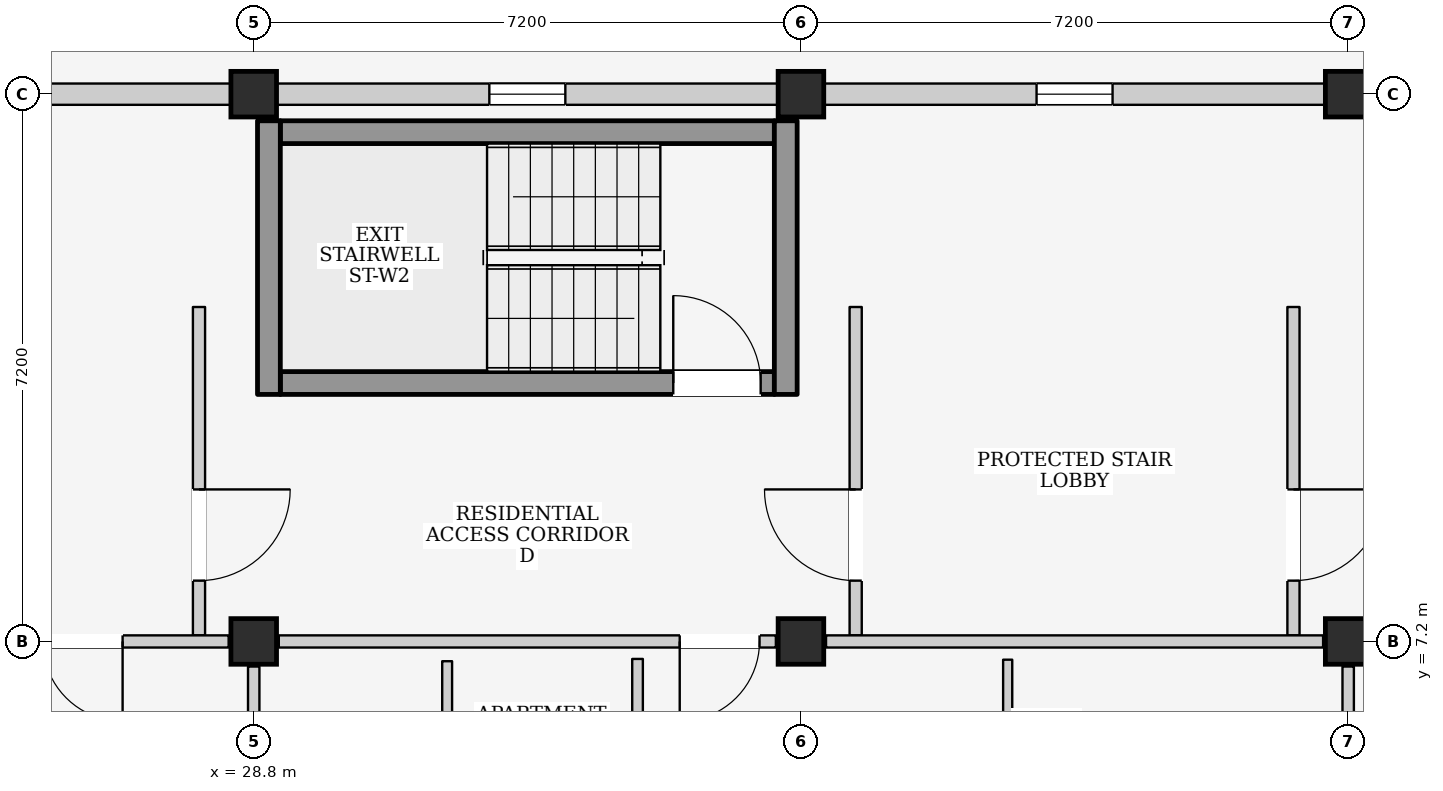
"""IFC4 building model, lengths in metres.
Left out: names, types, materials, properties, quantities, classifications, styles, units other than length and angle.
Written with IfcOpenShell. Run it as: python <this file> out.ifc"""

import sys

from ifc_helpers import new_model, si_unit, direction, frame, frame_2d, origin, origin_2d, place, context, subcontext, project, spatial, rectangle, extrude, element, fill, save


model = new_model("IFC4")
c1 = context("Model", 3, precision=1e-05, world=origin(), true_north=direction((0.0, 1.0)))
c2 = subcontext(c1, "Body", "Model", "MODEL_VIEW")
j1 = project(units=[si_unit("LENGTHUNIT", "METRE"), si_unit("PLANEANGLEUNIT", "RADIAN")], contexts=[c1])
p1 = place(None, origin())
s1 = spatial("IfcSite", under=j1, at=p1, CompositionType="ELEMENT")
p2 = place(p1, origin())
s2 = spatial("IfcBuilding", under=s1, at=p2, CompositionType="ELEMENT")
p3 = place(p2, frame((0.0, 0.0, 9.0)))
s3 = spatial("IfcBuildingStorey", under=s2, at=p3, CompositionType="ELEMENT", Elevation=9.0)
for number, where, z_axis, x_axis in (
    (1, (28.8, 7.2, 0.0), (0.0, 0.0, 1.0), (1.0, 0.0, 0.0)),
    (2, (28.8, 14.4, 0.0), (0.0, 0.0, 1.0), (1.0, 0.0, 0.0)),
    (3, (36.0, 7.2, 0.0), (0.0, 0.0, 1.0), (1.0, 0.0, 0.0)),
    (4, (36.0, 14.4, 0.0), (0.0, 0.0, 1.0), (1.0, 0.0, 0.0)),
    (5, (43.2, 7.2, 0.0), (0.0, 0.0, 1.0), (1.0, 0.0, 0.0)),
    (6, (43.2, 14.4, 0.0), (0.0, 0.0, 1.0), (1.0, 0.0, 0.0)),
):
    element("IfcColumn", number, at=place(p3, frame(where, z_axis=z_axis, x_axis=x_axis)), inside=s3, PredefinedType="COLUMN", context=c2, shape_type="SweptSolid", body=[
        extrude(rectangle(XDim=0.6, YDim=0.6, at=origin_2d()), origin(), (0.0, 0.0, 1.0), 3.2),
    ])
p4 = place(p3, frame((21.9, 14.4, 0.0), z_axis=(0.0, 0.0, 1.0), x_axis=(1.0, 0.0, 0.0)))
e7 = element("IfcWall", 7, at=p4, inside=s3, PredefinedType="ELEMENTEDWALL", context=c2, shape_type="SweptSolid", body=[
    extrude(rectangle(XDim=6.6, YDim=0.28, at=frame_2d((3.3, 0.0))), origin(), (0.0, 0.0, 1.0), 2.345),
])
p5 = place(p4, frame((2.8, 0.0, 1.2)))
e8 = element("IfcOpeningElement", 8, at=p5, cuts=e7, PredefinedType="OPENING", context=c2, shape_type="SweptSolid", body=[
    extrude(rectangle(XDim=1.0, YDim=0.9, at=frame_2d((0.5, 0.45))), frame((0.0, 0.155, 0.0), z_axis=(0.0, -1.0, 0.0), x_axis=(1.0, 0.0, 0.0)), (0.0, 0.0, 1.0), 0.31),
])
p6 = place(p3, frame((29.1, 14.4, 0.0), z_axis=(0.0, 0.0, 1.0), x_axis=(1.0, 0.0, 0.0)))
e9 = element("IfcWall", 9, at=p6, inside=s3, PredefinedType="ELEMENTEDWALL", context=c2, shape_type="SweptSolid", body=[
    extrude(rectangle(XDim=6.6, YDim=0.28, at=frame_2d((3.3, 0.0))), origin(), (0.0, 0.0, 1.0), 2.345),
])
p7 = place(p6, frame((2.8, 0.0, 1.2)))
e10 = element("IfcOpeningElement", 10, at=p7, cuts=e9, PredefinedType="OPENING", context=c2, shape_type="SweptSolid", body=[
    extrude(rectangle(XDim=1.0, YDim=0.9, at=frame_2d((0.5, 0.45))), frame((0.0, 0.155, 0.0), z_axis=(0.0, -1.0, 0.0), x_axis=(1.0, 0.0, 0.0)), (0.0, 0.0, 1.0), 0.31),
])
p8 = place(p3, frame((36.3, 14.4, 0.0), z_axis=(0.0, 0.0, 1.0), x_axis=(1.0, 0.0, 0.0)))
e11 = element("IfcWall", 11, at=p8, inside=s3, PredefinedType="ELEMENTEDWALL", context=c2, shape_type="SweptSolid", body=[
    extrude(rectangle(XDim=6.6, YDim=0.28, at=frame_2d((3.3, 0.0))), origin(), (0.0, 0.0, 1.0), 2.345),
])
p9 = place(p8, frame((2.8, 0.0, 1.2)))
e12 = element("IfcOpeningElement", 12, at=p9, cuts=e11, PredefinedType="OPENING", context=c2, shape_type="SweptSolid", body=[
    extrude(rectangle(XDim=1.0, YDim=0.9, at=frame_2d((0.5, 0.45))), frame((0.0, 0.155, 0.0), z_axis=(0.0, -1.0, 0.0), x_axis=(1.0, 0.0, 0.0)), (0.0, 0.0, 1.0), 0.31),
])
p10 = place(p3, frame((28.08, 7.28, 0.0), z_axis=(0.0, 0.0, 1.0), x_axis=(0.0, 1.0, 0.0)))
e13 = element("IfcWall", 13, at=p10, inside=s3, PredefinedType="PARTITIONING", context=c2, shape_type="SweptSolid", body=[
    extrude(rectangle(XDim=4.32, YDim=0.16, at=frame_2d((2.16, 0.0))), origin(), (0.0, 0.0, 1.0), 2.96),
])
p11 = place(p10, frame((0.72, 0.0, 0.0)))
e14 = element("IfcOpeningElement", 14, at=p11, cuts=e13, PredefinedType="OPENING", context=c2, shape_type="SweptSolid", body=[
    extrude(rectangle(XDim=1.2, YDim=2.2, at=frame_2d((0.6, 1.1))), frame((0.0, 0.095, 0.0), z_axis=(0.0, -1.0, 0.0), x_axis=(1.0, 0.0, 0.0)), (0.0, 0.0, 1.0), 0.19),
])
p12 = place(p3, frame((29.15, 10.6, 0.0), z_axis=(0.0, 0.0, 1.0), x_axis=(1.0, 0.0, 0.0)))
e15 = element("IfcWall", 15, at=p12, inside=s3, PredefinedType="SHEAR", context=c2, shape_type="SweptSolid", body=[
    extrude(rectangle(XDim=6.5, YDim=0.3, at=frame_2d((3.25, 0.0))), origin(), (0.0, 0.0, 1.0), 2.96),
])
p13 = place(p12, frame((5.17, 0.0, 0.0)))
e16 = element("IfcOpeningElement", 16, at=p13, cuts=e15, PredefinedType="OPENING", context=c2, shape_type="SweptSolid", body=[
    extrude(rectangle(XDim=1.15, YDim=2.2, at=frame_2d((0.575, 1.1))), frame((0.0, 0.165, 0.0), z_axis=(0.0, -1.0, 0.0), x_axis=(1.0, 0.0, 0.0)), (0.0, 0.0, 1.0), 0.33),
])
p14 = place(p3, frame((29.15, 13.9, 0.0), z_axis=(0.0, 0.0, 1.0), x_axis=(1.0, 0.0, 0.0)))
e17 = element("IfcWall", 17, at=p14, inside=s3, PredefinedType="SHEAR", context=c2, shape_type="SweptSolid", body=[
    extrude(rectangle(XDim=6.5, YDim=0.3, at=frame_2d((3.25, 0.0))), origin(), (0.0, 0.0, 1.0), 2.96),
])
for number, where, z_axis, x_axis in (
    (18, (29.0, 10.45, 0.0), (0.0, 0.0, 1.0), (0.0, 1.0, 0.0)),
    (19, (35.8, 10.45, 0.0), (0.0, 0.0, 1.0), (0.0, 1.0, 0.0)),
):
    element("IfcWall", number, at=place(p3, frame(where, z_axis=z_axis, x_axis=x_axis)), inside=s3, PredefinedType="SHEAR", context=c2, shape_type="SweptSolid", body=[
        extrude(rectangle(XDim=3.6, YDim=0.3, at=frame_2d((1.8, 0.0))), origin(), (0.0, 0.0, 1.0), 2.96),
    ])
p15 = place(p3, frame((36.72, 7.28, 0.0), z_axis=(0.0, 0.0, 1.0), x_axis=(0.0, 1.0, 0.0)))
e20 = element("IfcWall", 20, at=p15, inside=s3, PredefinedType="PARTITIONING", context=c2, shape_type="SweptSolid", body=[
    extrude(rectangle(XDim=4.32, YDim=0.16, at=frame_2d((2.16, 0.0))), origin(), (0.0, 0.0, 1.0), 2.96),
])
p16 = place(p15, frame((0.72, 0.0, 0.0)))
e21 = element("IfcOpeningElement", 21, at=p16, cuts=e20, PredefinedType="OPENING", context=c2, shape_type="SweptSolid", body=[
    extrude(rectangle(XDim=1.2, YDim=2.2, at=frame_2d((0.6, 1.1))), frame((0.0, 0.095, 0.0), z_axis=(0.0, -1.0, 0.0), x_axis=(1.0, 0.0, 0.0)), (0.0, 0.0, 1.0), 0.19),
])
p17 = place(p3, frame((42.48, 7.28, 0.0), z_axis=(0.0, 0.0, 1.0), x_axis=(0.0, 1.0, 0.0)))
e22 = element("IfcWall", 22, at=p17, inside=s3, PredefinedType="PARTITIONING", context=c2, shape_type="SweptSolid", body=[
    extrude(rectangle(XDim=4.32, YDim=0.16, at=frame_2d((2.16, 0.0))), origin(), (0.0, 0.0, 1.0), 2.96),
])
p18 = place(p17, frame((0.72, 0.0, 0.0)))
e23 = element("IfcOpeningElement", 23, at=p18, cuts=e22, PredefinedType="OPENING", context=c2, shape_type="SweptSolid", body=[
    extrude(rectangle(XDim=1.2, YDim=2.2, at=frame_2d((0.6, 1.1))), frame((0.0, 0.095, 0.0), z_axis=(0.0, -1.0, 0.0), x_axis=(1.0, 0.0, 0.0)), (0.0, 0.0, 1.0), 0.19),
])
p19 = place(p3, frame((21.93, 7.2, 0.0), z_axis=(0.0, 0.0, 1.0), x_axis=(1.0, 0.0, 0.0)))
e24 = element("IfcWall", 24, at=p19, inside=s3, PredefinedType="PARTITIONING", context=c2, shape_type="SweptSolid", body=[
    extrude(rectangle(XDim=6.54, YDim=0.16, at=frame_2d((3.27, 0.0))), origin(), (0.0, 0.0, 1.0), 2.345),
])
p20 = place(p19, frame((4.095, 0.0, 0.0)))
e25 = element("IfcOpeningElement", 25, at=p20, cuts=e24, PredefinedType="OPENING", context=c2, shape_type="SweptSolid", body=[
    extrude(rectangle(XDim=1.05, YDim=2.15, at=frame_2d((0.525, 1.075))), frame((0.0, 0.095, 0.0), z_axis=(0.0, -1.0, 0.0), x_axis=(1.0, 0.0, 0.0)), (0.0, 0.0, 1.0), 0.19),
])
p21 = place(p3, frame((28.8, 0.33, 0.0), z_axis=(0.0, 0.0, 1.0), x_axis=(0.0, 1.0, 0.0)))
e26 = element("IfcWall", 26, at=p21, inside=s3, PredefinedType="PARTITIONING", context=c2, shape_type="SweptSolid", body=[
    extrude(rectangle(XDim=6.54, YDim=0.15, at=frame_2d((3.27, 0.0))), origin(), (0.0, 0.0, 1.0), 2.395),
])
p22 = place(p3, frame((29.13, 7.2, 0.0), z_axis=(0.0, 0.0, 1.0), x_axis=(1.0, 0.0, 0.0)))
e27 = element("IfcWall", 27, at=p22, inside=s3, PredefinedType="PARTITIONING", context=c2, shape_type="SweptSolid", body=[
    extrude(rectangle(XDim=6.54, YDim=0.16, at=frame_2d((3.27, 0.0))), origin(), (0.0, 0.0, 1.0), 2.345),
])
p23 = place(p22, frame((5.275, 0.0, 0.0)))
e28 = element("IfcOpeningElement", 28, at=p23, cuts=e27, PredefinedType="OPENING", context=c2, shape_type="SweptSolid", body=[
    extrude(rectangle(XDim=1.05, YDim=2.15, at=frame_2d((0.525, 1.075))), frame((0.0, 0.095, 0.0), z_axis=(0.0, -1.0, 0.0), x_axis=(1.0, 0.0, 0.0)), (0.0, 0.0, 1.0), 0.19),
])
p24 = place(p3, frame((36.33, 7.2, 0.0), z_axis=(0.0, 0.0, 1.0), x_axis=(1.0, 0.0, 0.0)))
e29 = element("IfcWall", 29, at=p24, inside=s3, PredefinedType="PARTITIONING", context=c2, shape_type="SweptSolid", body=[
    extrude(rectangle(XDim=6.54, YDim=0.16, at=frame_2d((3.27, 0.0))), origin(), (0.0, 0.0, 1.0), 2.345),
])
p25 = place(p3, frame((43.2, 0.33, 0.0), z_axis=(0.0, 0.0, 1.0), x_axis=(0.0, 1.0, 0.0)))
e30 = element("IfcWall", 30, at=p25, inside=s3, PredefinedType="PARTITIONING", context=c2, shape_type="SweptSolid", body=[
    extrude(rectangle(XDim=6.54, YDim=0.15, at=frame_2d((3.27, 0.0))), origin(), (0.0, 0.0, 1.0), 2.395),
])
p26 = place(p3, frame((31.345, 3.9, 0.0), z_axis=(0.0, 0.0, 1.0), x_axis=(0.0, 1.0, 0.0)))
e31 = element("IfcWall", 31, at=p26, inside=s3, PredefinedType="PARTITIONING", context=c2, shape_type="SweptSolid", body=[
    extrude(rectangle(XDim=3.04, YDim=0.13, at=frame_2d((1.52, 0.0))), origin(), (0.0, 0.0, 1.0), 2.96),
])
p27 = place(p3, frame((33.85, 3.91, 0.0), z_axis=(0.0, 0.0, 1.0), x_axis=(0.0, 1.0, 0.0)))
e32 = element("IfcWall", 32, at=p27, inside=s3, PredefinedType="PARTITIONING", context=c2, shape_type="SweptSolid", body=[
    extrude(rectangle(XDim=3.06, YDim=0.14, at=frame_2d((1.53, 0.0))), origin(), (0.0, 0.0, 1.0), 2.96),
])
p28 = place(p3, frame((38.72, 3.92, 0.0), z_axis=(0.0, 0.0, 1.0), x_axis=(0.0, 1.0, 0.0)))
e33 = element("IfcWall", 33, at=p28, inside=s3, PredefinedType="PARTITIONING", context=c2, shape_type="SweptSolid", body=[
    extrude(rectangle(XDim=3.04, YDim=0.12, at=frame_2d((1.52, 0.0))), origin(), (0.0, 0.0, 1.0), 2.96),
])
p29 = place(p28, frame((1.04, 0.0, 0.0)))
e34 = element("IfcOpeningElement", 34, at=p29, cuts=e33, PredefinedType="OPENING", context=c2, shape_type="SweptSolid", body=[
    extrude(rectangle(XDim=0.96, YDim=2.15, at=frame_2d((0.48, 1.075))), frame((0.0, 0.075, 0.0), z_axis=(0.0, -1.0, 0.0), x_axis=(1.0, 0.0, 0.0)), (0.0, 0.0, 1.0), 0.15),
])
p30 = place(p7, origin())
e35 = element("IfcWindow", 35, at=p30, inside=s3, PartitioningType="SINGLE_PANEL", PredefinedType="WINDOW", context=c2, shape_type="SweptSolid", body=[
    extrude(rectangle(XDim=1.0, YDim=0.9, at=frame_2d((0.5, 0.45))), frame((0.0, 0.03, 0.0), z_axis=(0.0, -1.0, 0.0), x_axis=(1.0, 0.0, 0.0)), (0.0, 0.0, 1.0), 0.06),
])
fill(e10, e35)
p31 = place(p9, origin())
e36 = element("IfcWindow", 36, at=p31, inside=s3, PartitioningType="SINGLE_PANEL", PredefinedType="WINDOW", context=c2, shape_type="SweptSolid", body=[
    extrude(rectangle(XDim=1.0, YDim=0.9, at=frame_2d((0.5, 0.45))), frame((0.0, 0.03, 0.0), z_axis=(0.0, -1.0, 0.0), x_axis=(1.0, 0.0, 0.0)), (0.0, 0.0, 1.0), 0.06),
])
fill(e12, e36)
p32 = place(p11, frame((1.2, 0.0, 0.0), z_axis=(0.0, 0.0, 1.0), x_axis=(-1.0, 0.0, 0.0)))
e37 = element("IfcDoor", 37, at=p32, inside=s3, OperationType="SINGLE_SWING_LEFT", PredefinedType="DOOR", context=c2, shape_type="SweptSolid", body=[
    extrude(rectangle(XDim=1.2, YDim=2.2, at=frame_2d((0.6, 1.1))), frame((0.0, 0.025, 0.0), z_axis=(0.0, -1.0, 0.0), x_axis=(1.0, 0.0, 0.0)), (0.0, 0.0, 1.0), 0.05),
])
fill(e14, e37)
p33 = place(p13, origin())
e38 = element("IfcDoor", 38, at=p33, inside=s3, OperationType="SINGLE_SWING_LEFT", PredefinedType="DOOR", context=c2, shape_type="SweptSolid", body=[
    extrude(rectangle(XDim=1.15, YDim=2.2, at=frame_2d((0.575, 1.1))), frame((0.0, 0.025, 0.0), z_axis=(0.0, -1.0, 0.0), x_axis=(1.0, 0.0, 0.0)), (0.0, 0.0, 1.0), 0.05),
])
fill(e16, e38)
p34 = place(p16, origin())
e39 = element("IfcDoor", 39, at=p34, inside=s3, OperationType="SINGLE_SWING_RIGHT", PredefinedType="DOOR", context=c2, shape_type="SweptSolid", body=[
    extrude(rectangle(XDim=1.2, YDim=2.2, at=frame_2d((0.6, 1.1))), frame((0.0, 0.025, 0.0), z_axis=(0.0, -1.0, 0.0), x_axis=(1.0, 0.0, 0.0)), (0.0, 0.0, 1.0), 0.05),
])
fill(e21, e39)
p35 = place(p18, frame((1.2, 0.0, 0.0), z_axis=(0.0, 0.0, 1.0), x_axis=(-1.0, 0.0, 0.0)))
e40 = element("IfcDoor", 40, at=p35, inside=s3, OperationType="SINGLE_SWING_LEFT", PredefinedType="DOOR", context=c2, shape_type="SweptSolid", body=[
    extrude(rectangle(XDim=1.2, YDim=2.2, at=frame_2d((0.6, 1.1))), frame((0.0, 0.025, 0.0), z_axis=(0.0, -1.0, 0.0), x_axis=(1.0, 0.0, 0.0)), (0.0, 0.0, 1.0), 0.05),
])
fill(e23, e40)
p36 = place(p20, frame((1.05, 0.0, 0.0), z_axis=(0.0, 0.0, 1.0), x_axis=(-1.0, 0.0, 0.0)))
e41 = element("IfcDoor", 41, at=p36, inside=s3, OperationType="SINGLE_SWING_LEFT", PredefinedType="DOOR", context=c2, shape_type="SweptSolid", body=[
    extrude(rectangle(XDim=1.05, YDim=2.15, at=frame_2d((0.525, 1.075))), frame((0.0, 0.025, 0.0), z_axis=(0.0, -1.0, 0.0), x_axis=(1.0, 0.0, 0.0)), (0.0, 0.0, 1.0), 0.05),
])
fill(e25, e41)
p37 = place(p23, frame((1.05, 0.0, 0.0), z_axis=(0.0, 0.0, 1.0), x_axis=(-1.0, 0.0, 0.0)))
e42 = element("IfcDoor", 42, at=p37, inside=s3, OperationType="SINGLE_SWING_RIGHT", PredefinedType="DOOR", context=c2, shape_type="SweptSolid", body=[
    extrude(rectangle(XDim=1.05, YDim=2.15, at=frame_2d((0.525, 1.075))), frame((0.0, 0.025, 0.0), z_axis=(0.0, -1.0, 0.0), x_axis=(1.0, 0.0, 0.0)), (0.0, 0.0, 1.0), 0.05),
])
fill(e28, e42)
save(model, sys.argv[1])
